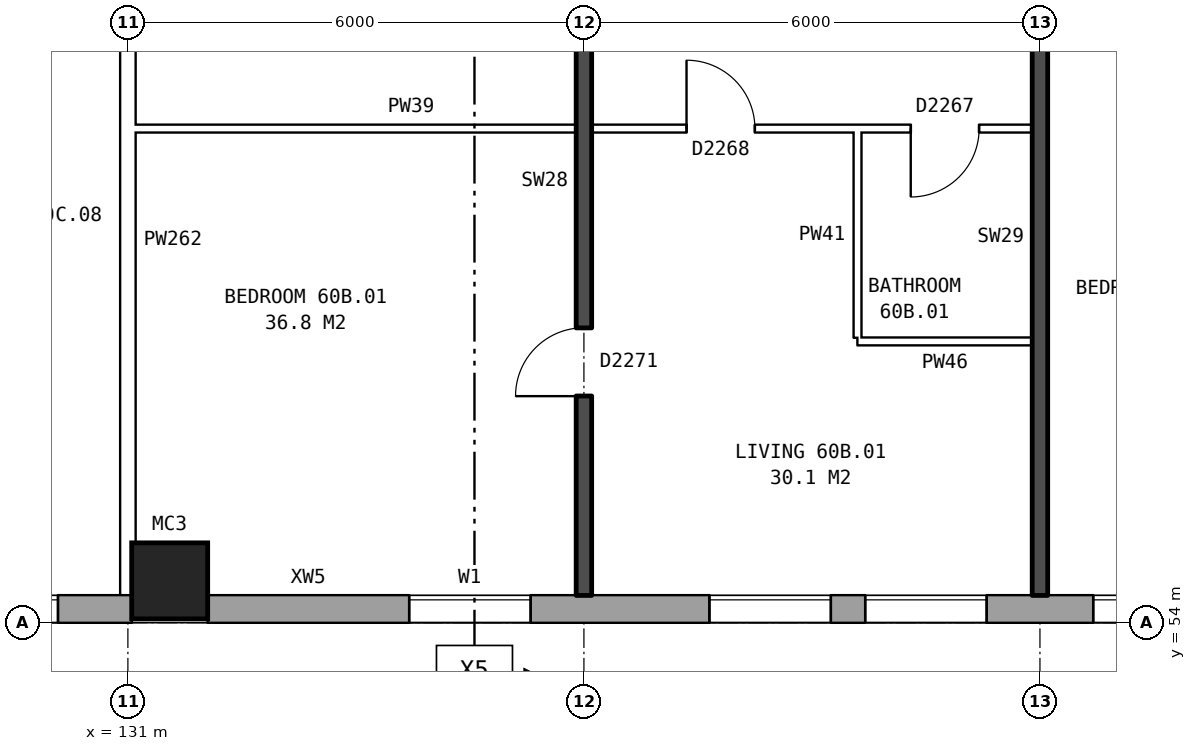
"""IFC4 building model, lengths in metres.
Left out: names, types, materials, properties, quantities, classifications, styles, units other than length and angle.
Written with IfcOpenShell. Run it as: python <this file> out.ifc"""

import sys

from ifc_helpers import new_model, si_unit, direction, frame, frame_2d, origin, origin_2d, place, context, subcontext, project, spatial, rectangle, hollow_rectangle, extrude, element, fill, save


model = new_model("IFC4")
c1 = context("Model", 3, precision=1e-05, world=origin(), true_north=direction((0.0, 1.0)))
c2 = subcontext(c1, "Body", "Model", "MODEL_VIEW")
j1 = project(units=[si_unit("LENGTHUNIT", "METRE"), si_unit("PLANEANGLEUNIT", "RADIAN")], contexts=[c1])
p1 = place(None, origin())
s1 = spatial("IfcSite", under=j1, at=p1, CompositionType="ELEMENT")
p2 = place(p1, origin())
s2 = spatial("IfcBuilding", under=s1, at=p2, CompositionType="ELEMENT")
p3 = place(p2, frame((0.0, 0.0, 212.1)))
s3 = spatial("IfcBuildingStorey", under=s2, at=p3, CompositionType="ELEMENT", Elevation=212.1)
p4 = place(p3, frame((131.55, 54.55, 0.0), z_axis=(0.0, 0.0, 1.0), x_axis=(1.0, 0.0, 0.0)))
e1 = element("IfcColumn", 1, at=p4, inside=s3, PredefinedType="COLUMN", context=c2, shape_type="SweptSolid", body=[
    extrude(hollow_rectangle(XDim=1.0, YDim=1.0, WallThickness=0.055, at=origin_2d()), origin(), (0.0, 0.0, 1.0), 3.1),
])
p5 = place(p3, frame((75.95, 54.18, 0.0), z_axis=(0.0, 0.0, 1.0), x_axis=(1.0, 0.0, 0.0)))
e2 = element("IfcWall", 2, at=p5, inside=s3, PredefinedType="STANDARD", context=c2, shape_type="SweptSolid", body=[
    extrude(rectangle(XDim=55.1, YDim=0.36, at=frame_2d((27.55, 0.0))), origin(), (0.0, 0.0, 1.0), 2.85),
])
p6 = place(p5, frame((0.969, 0.0, 0.8)))
e3 = element("IfcOpeningElement", 3, at=p6, cuts=e2, PredefinedType="OPENING", context=c2, shape_type="SweptSolid", body=[
    extrude(rectangle(XDim=1.6, YDim=1.8, at=frame_2d((0.8, 0.9))), frame((0.0, 0.19, 0.0), z_axis=(0.0, -1.0, 0.0), x_axis=(1.0, 0.0, 0.0)), (0.0, 0.0, 1.0), 0.38),
])
p7 = place(p5, frame((4.406, 0.0, 0.8)))
e4 = element("IfcOpeningElement", 4, at=p7, cuts=e2, PredefinedType="OPENING", context=c2, shape_type="SweptSolid", body=[
    extrude(rectangle(XDim=1.6, YDim=1.8, at=frame_2d((0.8, 0.9))), frame((0.0, 0.19, 0.0), z_axis=(0.0, -1.0, 0.0), x_axis=(1.0, 0.0, 0.0)), (0.0, 0.0, 1.0), 0.38),
])
p8 = place(p5, frame((7.844, 0.0, 0.8)))
e5 = element("IfcOpeningElement", 5, at=p8, cuts=e2, PredefinedType="OPENING", context=c2, shape_type="SweptSolid", body=[
    extrude(rectangle(XDim=1.6, YDim=1.8, at=frame_2d((0.8, 0.9))), frame((0.0, 0.19, 0.0), z_axis=(0.0, -1.0, 0.0), x_axis=(1.0, 0.0, 0.0)), (0.0, 0.0, 1.0), 0.38),
])
p9 = place(p5, frame((11.281, 0.0, 0.8)))
e6 = element("IfcOpeningElement", 6, at=p9, cuts=e2, PredefinedType="OPENING", context=c2, shape_type="SweptSolid", body=[
    extrude(rectangle(XDim=1.6, YDim=1.8, at=frame_2d((0.8, 0.9))), frame((0.0, 0.19, 0.0), z_axis=(0.0, -1.0, 0.0), x_axis=(1.0, 0.0, 0.0)), (0.0, 0.0, 1.0), 0.38),
])
p10 = place(p5, frame((14.719, 0.0, 0.8)))
e7 = element("IfcOpeningElement", 7, at=p10, cuts=e2, PredefinedType="OPENING", context=c2, shape_type="SweptSolid", body=[
    extrude(rectangle(XDim=1.6, YDim=1.8, at=frame_2d((0.8, 0.9))), frame((0.0, 0.19, 0.0), z_axis=(0.0, -1.0, 0.0), x_axis=(1.0, 0.0, 0.0)), (0.0, 0.0, 1.0), 0.38),
])
p11 = place(p5, frame((18.156, 0.0, 0.8)))
e8 = element("IfcOpeningElement", 8, at=p11, cuts=e2, PredefinedType="OPENING", context=c2, shape_type="SweptSolid", body=[
    extrude(rectangle(XDim=1.6, YDim=1.8, at=frame_2d((0.8, 0.9))), frame((0.0, 0.19, 0.0), z_axis=(0.0, -1.0, 0.0), x_axis=(1.0, 0.0, 0.0)), (0.0, 0.0, 1.0), 0.38),
])
p12 = place(p5, frame((21.594, 0.0, 0.8)))
e9 = element("IfcOpeningElement", 9, at=p12, cuts=e2, PredefinedType="OPENING", context=c2, shape_type="SweptSolid", body=[
    extrude(rectangle(XDim=1.6, YDim=1.8, at=frame_2d((0.8, 0.9))), frame((0.0, 0.19, 0.0), z_axis=(0.0, -1.0, 0.0), x_axis=(1.0, 0.0, 0.0)), (0.0, 0.0, 1.0), 0.38),
])
p13 = place(p5, frame((25.031, 0.0, 0.8)))
e10 = element("IfcOpeningElement", 10, at=p13, cuts=e2, PredefinedType="OPENING", context=c2, shape_type="SweptSolid", body=[
    extrude(rectangle(XDim=1.6, YDim=1.8, at=frame_2d((0.8, 0.9))), frame((0.0, 0.19, 0.0), z_axis=(0.0, -1.0, 0.0), x_axis=(1.0, 0.0, 0.0)), (0.0, 0.0, 1.0), 0.38),
])
p14 = place(p5, frame((28.469, 0.0, 0.8)))
e11 = element("IfcOpeningElement", 11, at=p14, cuts=e2, PredefinedType="OPENING", context=c2, shape_type="SweptSolid", body=[
    extrude(rectangle(XDim=1.6, YDim=1.8, at=frame_2d((0.8, 0.9))), frame((0.0, 0.19, 0.0), z_axis=(0.0, -1.0, 0.0), x_axis=(1.0, 0.0, 0.0)), (0.0, 0.0, 1.0), 0.38),
])
p15 = place(p5, frame((31.906, 0.0, 0.8)))
e12 = element("IfcOpeningElement", 12, at=p15, cuts=e2, PredefinedType="OPENING", context=c2, shape_type="SweptSolid", body=[
    extrude(rectangle(XDim=1.6, YDim=1.8, at=frame_2d((0.8, 0.9))), frame((0.0, 0.19, 0.0), z_axis=(0.0, -1.0, 0.0), x_axis=(1.0, 0.0, 0.0)), (0.0, 0.0, 1.0), 0.38),
])
p16 = place(p5, frame((35.344, 0.0, 0.8)))
e13 = element("IfcOpeningElement", 13, at=p16, cuts=e2, PredefinedType="OPENING", context=c2, shape_type="SweptSolid", body=[
    extrude(rectangle(XDim=1.6, YDim=1.8, at=frame_2d((0.8, 0.9))), frame((0.0, 0.19, 0.0), z_axis=(0.0, -1.0, 0.0), x_axis=(1.0, 0.0, 0.0)), (0.0, 0.0, 1.0), 0.38),
])
p17 = place(p5, frame((38.781, 0.0, 0.8)))
e14 = element("IfcOpeningElement", 14, at=p17, cuts=e2, PredefinedType="OPENING", context=c2, shape_type="SweptSolid", body=[
    extrude(rectangle(XDim=1.6, YDim=1.8, at=frame_2d((0.8, 0.9))), frame((0.0, 0.19, 0.0), z_axis=(0.0, -1.0, 0.0), x_axis=(1.0, 0.0, 0.0)), (0.0, 0.0, 1.0), 0.38),
])
p18 = place(p5, frame((42.219, 0.0, 0.8)))
e15 = element("IfcOpeningElement", 15, at=p18, cuts=e2, PredefinedType="OPENING", context=c2, shape_type="SweptSolid", body=[
    extrude(rectangle(XDim=1.6, YDim=1.8, at=frame_2d((0.8, 0.9))), frame((0.0, 0.19, 0.0), z_axis=(0.0, -1.0, 0.0), x_axis=(1.0, 0.0, 0.0)), (0.0, 0.0, 1.0), 0.38),
])
p19 = place(p5, frame((45.656, 0.0, 0.8)))
e16 = element("IfcOpeningElement", 16, at=p19, cuts=e2, PredefinedType="OPENING", context=c2, shape_type="SweptSolid", body=[
    extrude(rectangle(XDim=1.6, YDim=1.8, at=frame_2d((0.8, 0.9))), frame((0.0, 0.19, 0.0), z_axis=(0.0, -1.0, 0.0), x_axis=(1.0, 0.0, 0.0)), (0.0, 0.0, 1.0), 0.38),
])
p20 = place(p5, frame((49.094, 0.0, 0.8)))
e17 = element("IfcOpeningElement", 17, at=p20, cuts=e2, PredefinedType="OPENING", context=c2, shape_type="SweptSolid", body=[
    extrude(rectangle(XDim=1.6, YDim=1.8, at=frame_2d((0.8, 0.9))), frame((0.0, 0.19, 0.0), z_axis=(0.0, -1.0, 0.0), x_axis=(1.0, 0.0, 0.0)), (0.0, 0.0, 1.0), 0.38),
])
p21 = place(p5, frame((52.531, 0.0, 0.8)))
e18 = element("IfcOpeningElement", 18, at=p21, cuts=e2, PredefinedType="OPENING", context=c2, shape_type="SweptSolid", body=[
    extrude(rectangle(XDim=1.6, YDim=1.8, at=frame_2d((0.8, 0.9))), frame((0.0, 0.19, 0.0), z_axis=(0.0, -1.0, 0.0), x_axis=(1.0, 0.0, 0.0)), (0.0, 0.0, 1.0), 0.38),
])
p22 = place(p3, frame((132.05, 54.18, 0.0), z_axis=(0.0, 0.0, 1.0), x_axis=(1.0, 0.0, 0.0)))
e19 = element("IfcWall", 19, at=p22, inside=s3, PredefinedType="STANDARD", context=c2, shape_type="SweptSolid", body=[
    extrude(rectangle(XDim=33.875, YDim=0.36, at=frame_2d((16.938, 0.0))), origin(), (0.0, 0.0, 1.0), 2.85),
])
p23 = place(p22, frame((2.65, 0.0, 0.8)))
e20 = element("IfcOpeningElement", 20, at=p23, cuts=e19, PredefinedType="OPENING", context=c2, shape_type="SweptSolid", body=[
    extrude(rectangle(XDim=1.6, YDim=1.8, at=frame_2d((0.8, 0.9))), frame((0.0, 0.19, 0.0), z_axis=(0.0, -1.0, 0.0), x_axis=(1.0, 0.0, 0.0)), (0.0, 0.0, 1.0), 0.38),
])
p24 = place(p22, frame((6.6, 0.0, 0.8)))
e21 = element("IfcOpeningElement", 21, at=p24, cuts=e19, PredefinedType="OPENING", context=c2, shape_type="SweptSolid", body=[
    extrude(rectangle(XDim=1.6, YDim=1.8, at=frame_2d((0.8, 0.9))), frame((0.0, 0.19, 0.0), z_axis=(0.0, -1.0, 0.0), x_axis=(1.0, 0.0, 0.0)), (0.0, 0.0, 1.0), 0.38),
])
p25 = place(p22, frame((8.65, 0.0, 0.8)))
e22 = element("IfcOpeningElement", 22, at=p25, cuts=e19, PredefinedType="OPENING", context=c2, shape_type="SweptSolid", body=[
    extrude(rectangle(XDim=1.6, YDim=1.8, at=frame_2d((0.8, 0.9))), frame((0.0, 0.19, 0.0), z_axis=(0.0, -1.0, 0.0), x_axis=(1.0, 0.0, 0.0)), (0.0, 0.0, 1.0), 0.38),
])
p26 = place(p22, frame((11.65, 0.0, 0.8)))
e23 = element("IfcOpeningElement", 23, at=p26, cuts=e19, PredefinedType="OPENING", context=c2, shape_type="SweptSolid", body=[
    extrude(rectangle(XDim=1.6, YDim=1.8, at=frame_2d((0.8, 0.9))), frame((0.0, 0.19, 0.0), z_axis=(0.0, -1.0, 0.0), x_axis=(1.0, 0.0, 0.0)), (0.0, 0.0, 1.0), 0.38),
])
p27 = place(p22, frame((14.65, 0.0, 0.8)))
e24 = element("IfcOpeningElement", 24, at=p27, cuts=e19, PredefinedType="OPENING", context=c2, shape_type="SweptSolid", body=[
    extrude(rectangle(XDim=1.6, YDim=1.8, at=frame_2d((0.8, 0.9))), frame((0.0, 0.19, 0.0), z_axis=(0.0, -1.0, 0.0), x_axis=(1.0, 0.0, 0.0)), (0.0, 0.0, 1.0), 0.38),
])
p28 = place(p22, frame((17.65, 0.0, 0.8)))
e25 = element("IfcOpeningElement", 25, at=p28, cuts=e19, PredefinedType="OPENING", context=c2, shape_type="SweptSolid", body=[
    extrude(rectangle(XDim=1.6, YDim=1.8, at=frame_2d((0.8, 0.9))), frame((0.0, 0.19, 0.0), z_axis=(0.0, -1.0, 0.0), x_axis=(1.0, 0.0, 0.0)), (0.0, 0.0, 1.0), 0.38),
])
p29 = place(p22, frame((20.65, 0.0, 0.8)))
e26 = element("IfcOpeningElement", 26, at=p29, cuts=e19, PredefinedType="OPENING", context=c2, shape_type="SweptSolid", body=[
    extrude(rectangle(XDim=1.6, YDim=1.8, at=frame_2d((0.8, 0.9))), frame((0.0, 0.19, 0.0), z_axis=(0.0, -1.0, 0.0), x_axis=(1.0, 0.0, 0.0)), (0.0, 0.0, 1.0), 0.38),
])
p30 = place(p22, frame((23.65, 0.0, 0.8)))
e27 = element("IfcOpeningElement", 27, at=p30, cuts=e19, PredefinedType="OPENING", context=c2, shape_type="SweptSolid", body=[
    extrude(rectangle(XDim=1.6, YDim=1.8, at=frame_2d((0.8, 0.9))), frame((0.0, 0.19, 0.0), z_axis=(0.0, -1.0, 0.0), x_axis=(1.0, 0.0, 0.0)), (0.0, 0.0, 1.0), 0.38),
])
p31 = place(p22, frame((26.65, 0.0, 0.8)))
e28 = element("IfcOpeningElement", 28, at=p31, cuts=e19, PredefinedType="OPENING", context=c2, shape_type="SweptSolid", body=[
    extrude(rectangle(XDim=1.6, YDim=1.8, at=frame_2d((0.8, 0.9))), frame((0.0, 0.19, 0.0), z_axis=(0.0, -1.0, 0.0), x_axis=(1.0, 0.0, 0.0)), (0.0, 0.0, 1.0), 0.38),
])
p32 = place(p22, frame((29.15, 0.0, 0.8)))
e29 = element("IfcOpeningElement", 29, at=p32, cuts=e19, PredefinedType="OPENING", context=c2, shape_type="SweptSolid", body=[
    extrude(rectangle(XDim=0.6, YDim=0.9, at=frame_2d((0.3, 0.45))), frame((0.0, 0.19, 0.0), z_axis=(0.0, -1.0, 0.0), x_axis=(1.0, 0.0, 0.0)), (0.0, 0.0, 1.0), 0.38),
])
p33 = place(p22, frame((31.25, 0.0, 1.1)))
e30 = element("IfcOpeningElement", 30, at=p33, cuts=e19, PredefinedType="OPENING", context=c2, shape_type="SweptSolid", body=[
    extrude(rectangle(XDim=1.4, YDim=1.5, at=frame_2d((0.7, 0.75))), frame((0.0, 0.19, 0.0), z_axis=(0.0, -1.0, 0.0), x_axis=(1.0, 0.0, 0.0)), (0.0, 0.0, 1.0), 0.38),
])
p34 = place(p22, frame((32.95, 0.0, 0.8)))
e31 = element("IfcOpeningElement", 31, at=p34, cuts=e19, PredefinedType="OPENING", context=c2, shape_type="SweptSolid", body=[
    extrude(rectangle(XDim=0.6, YDim=1.8, at=frame_2d((0.3, 0.9))), frame((0.0, 0.19, 0.0), z_axis=(0.0, -1.0, 0.0), x_axis=(1.0, 0.0, 0.0)), (0.0, 0.0, 1.0), 0.38),
])
p35 = place(p3, frame((140.6, 57.7, 0.0), z_axis=(0.0, 0.0, 1.0), x_axis=(1.0, 0.0, 0.0)))
e32 = element("IfcWall", 32, at=p35, inside=s3, PredefinedType="PARTITIONING", context=c2, shape_type="SweptSolid", body=[
    extrude(rectangle(XDim=2.3, YDim=0.1, at=frame_2d((1.15, 0.0))), origin(), (0.0, 0.0, 1.0), 2.85),
])
p36 = place(p3, frame((131.1, 60.5, 0.0), z_axis=(0.0, 0.0, 1.0), x_axis=(1.0, 0.0, 0.0)))
e33 = element("IfcWall", 33, at=p36, inside=s3, PredefinedType="PARTITIONING", context=c2, shape_type="SweptSolid", body=[
    extrude(rectangle(XDim=11.8, YDim=0.1, at=frame_2d((5.9, 0.0))), origin(), (0.0, 0.0, 1.0), 2.85),
])
p37 = place(p36, frame((7.25, 0.0, 0.0)))
e34 = element("IfcOpeningElement", 34, at=p37, cuts=e33, PredefinedType="OPENING", context=c2, shape_type="SweptSolid", body=[
    extrude(rectangle(XDim=0.9, YDim=2.1, at=frame_2d((0.45, 1.05))), frame((0.0, 0.06, 0.0), z_axis=(0.0, -1.0, 0.0), x_axis=(1.0, 0.0, 0.0)), (0.0, 0.0, 1.0), 0.12),
])
p38 = place(p36, frame((10.2, 0.0, 0.0)))
e35 = element("IfcOpeningElement", 35, at=p38, cuts=e33, PredefinedType="OPENING", context=c2, shape_type="SweptSolid", body=[
    extrude(rectangle(XDim=0.9, YDim=2.1, at=frame_2d((0.45, 1.05))), frame((0.0, 0.06, 0.0), z_axis=(0.0, -1.0, 0.0), x_axis=(1.0, 0.0, 0.0)), (0.0, 0.0, 1.0), 0.12),
])
p39 = place(p3, frame((131.0, 54.36, 0.0), z_axis=(0.0, 0.0, 1.0), x_axis=(0.0, 1.0, 0.0)))
e36 = element("IfcWall", 36, at=p39, inside=s3, PredefinedType="PARTITIONING", context=c2, shape_type="SweptSolid", body=[
    extrude(rectangle(XDim=9.34, YDim=0.2, at=frame_2d((4.67, 0.0))), origin(), (0.0, 0.0, 1.0), 2.85),
])
p40 = place(p3, frame((137.0, 54.36, 0.0), z_axis=(0.0, 0.0, 1.0), x_axis=(0.0, 1.0, 0.0)))
e37 = element("IfcWall", 37, at=p40, inside=s3, PredefinedType="SOLIDWALL", context=c2, shape_type="SweptSolid", body=[
    extrude(rectangle(XDim=9.44, YDim=0.2, at=frame_2d((4.72, 0.0))), origin(), (0.0, 0.0, 1.0), 2.85),
])
p41 = place(p40, frame((2.62, 0.0, 0.0)))
e38 = element("IfcOpeningElement", 38, at=p41, cuts=e37, PredefinedType="OPENING", context=c2, shape_type="SweptSolid", body=[
    extrude(rectangle(XDim=0.9, YDim=2.1, at=frame_2d((0.45, 1.05))), frame((0.0, 0.11, 0.0), z_axis=(0.0, -1.0, 0.0), x_axis=(1.0, 0.0, 0.0)), (0.0, 0.0, 1.0), 0.22),
])
p42 = place(p40, frame((7.39, 0.0, 0.0)))
e39 = element("IfcOpeningElement", 39, at=p42, cuts=e37, PredefinedType="OPENING", context=c2, shape_type="SweptSolid", body=[
    extrude(rectangle(XDim=0.8, YDim=2.1, at=frame_2d((0.4, 1.05))), frame((0.0, 0.11, 0.0), z_axis=(0.0, -1.0, 0.0), x_axis=(1.0, 0.0, 0.0)), (0.0, 0.0, 1.0), 0.22),
])
p43 = place(p3, frame((140.6, 57.75, 0.0), z_axis=(0.0, 0.0, 1.0), x_axis=(0.0, 1.0, 0.0)))
e40 = element("IfcWall", 40, at=p43, inside=s3, PredefinedType="PARTITIONING", context=c2, shape_type="SweptSolid", body=[
    extrude(rectangle(XDim=2.7, YDim=0.1, at=frame_2d((1.35, 0.0))), origin(), (0.0, 0.0, 1.0), 2.85),
])
p44 = place(p3, frame((143.0, 54.36, 0.0), z_axis=(0.0, 0.0, 1.0), x_axis=(0.0, 1.0, 0.0)))
e41 = element("IfcWall", 41, at=p44, inside=s3, PredefinedType="SOLIDWALL", context=c2, shape_type="SweptSolid", body=[
    extrude(rectangle(XDim=9.44, YDim=0.2, at=frame_2d((4.72, 0.0))), origin(), (0.0, 0.0, 1.0), 2.85),
])
p45 = place(p21, origin())
e42 = element("IfcWindow", 42, at=p45, inside=s3, PartitioningType="SINGLE_PANEL", PredefinedType="WINDOW", context=c2, shape_type="SweptSolid", body=[
    extrude(rectangle(XDim=1.6, YDim=1.8, at=frame_2d((0.8, 0.9))), frame((0.0, 0.15, 0.0), z_axis=(0.0, -1.0, 0.0), x_axis=(1.0, 0.0, 0.0)), (0.0, 0.0, 1.0), 0.06),
])
fill(e18, e42)
p46 = place(p23, origin())
e43 = element("IfcWindow", 43, at=p46, inside=s3, PartitioningType="SINGLE_PANEL", PredefinedType="WINDOW", context=c2, shape_type="SweptSolid", body=[
    extrude(rectangle(XDim=1.6, YDim=1.8, at=frame_2d((0.8, 0.9))), frame((0.0, 0.15, 0.0), z_axis=(0.0, -1.0, 0.0), x_axis=(1.0, 0.0, 0.0)), (0.0, 0.0, 1.0), 0.06),
])
fill(e20, e43)
p47 = place(p24, origin())
e44 = element("IfcWindow", 44, at=p47, inside=s3, PartitioningType="SINGLE_PANEL", PredefinedType="WINDOW", context=c2, shape_type="SweptSolid", body=[
    extrude(rectangle(XDim=1.6, YDim=1.8, at=frame_2d((0.8, 0.9))), frame((0.0, 0.15, 0.0), z_axis=(0.0, -1.0, 0.0), x_axis=(1.0, 0.0, 0.0)), (0.0, 0.0, 1.0), 0.06),
])
fill(e21, e44)
p48 = place(p25, origin())
e45 = element("IfcWindow", 45, at=p48, inside=s3, PartitioningType="SINGLE_PANEL", PredefinedType="WINDOW", context=c2, shape_type="SweptSolid", body=[
    extrude(rectangle(XDim=1.6, YDim=1.8, at=frame_2d((0.8, 0.9))), frame((0.0, 0.15, 0.0), z_axis=(0.0, -1.0, 0.0), x_axis=(1.0, 0.0, 0.0)), (0.0, 0.0, 1.0), 0.06),
])
fill(e22, e45)
p49 = place(p26, origin())
e46 = element("IfcWindow", 46, at=p49, inside=s3, PartitioningType="SINGLE_PANEL", PredefinedType="WINDOW", context=c2, shape_type="SweptSolid", body=[
    extrude(rectangle(XDim=1.6, YDim=1.8, at=frame_2d((0.8, 0.9))), frame((0.0, 0.15, 0.0), z_axis=(0.0, -1.0, 0.0), x_axis=(1.0, 0.0, 0.0)), (0.0, 0.0, 1.0), 0.06),
])
fill(e23, e46)
p50 = place(p41, origin())
e47 = element("IfcDoor", 47, at=p50, inside=s3, OperationType="SINGLE_SWING_LEFT", PredefinedType="DOOR", context=c2, shape_type="SweptSolid", body=[
    extrude(rectangle(XDim=0.9, YDim=2.1, at=frame_2d((0.45, 1.05))), frame((0.0, 0.025, 0.0), z_axis=(0.0, -1.0, 0.0), x_axis=(1.0, 0.0, 0.0)), (0.0, 0.0, 1.0), 0.05),
])
fill(e38, e47)
p51 = place(p37, origin())
e48 = element("IfcDoor", 48, at=p51, inside=s3, OperationType="SINGLE_SWING_LEFT", PredefinedType="DOOR", context=c2, shape_type="SweptSolid", body=[
    extrude(rectangle(XDim=0.9, YDim=2.1, at=frame_2d((0.45, 1.05))), frame((0.0, 0.025, 0.0), z_axis=(0.0, -1.0, 0.0), x_axis=(1.0, 0.0, 0.0)), (0.0, 0.0, 1.0), 0.05),
])
fill(e34, e48)
p52 = place(p38, frame((0.9, 0.0, 0.0), z_axis=(0.0, 0.0, 1.0), x_axis=(-1.0, 0.0, 0.0)))
e49 = element("IfcDoor", 49, at=p52, inside=s3, OperationType="SINGLE_SWING_RIGHT", PredefinedType="DOOR", context=c2, shape_type="SweptSolid", body=[
    extrude(rectangle(XDim=0.9, YDim=2.1, at=frame_2d((0.45, 1.05))), frame((0.0, 0.025, 0.0), z_axis=(0.0, -1.0, 0.0), x_axis=(1.0, 0.0, 0.0)), (0.0, 0.0, 1.0), 0.05),
])
fill(e35, e49)
save(model, sys.argv[1])
